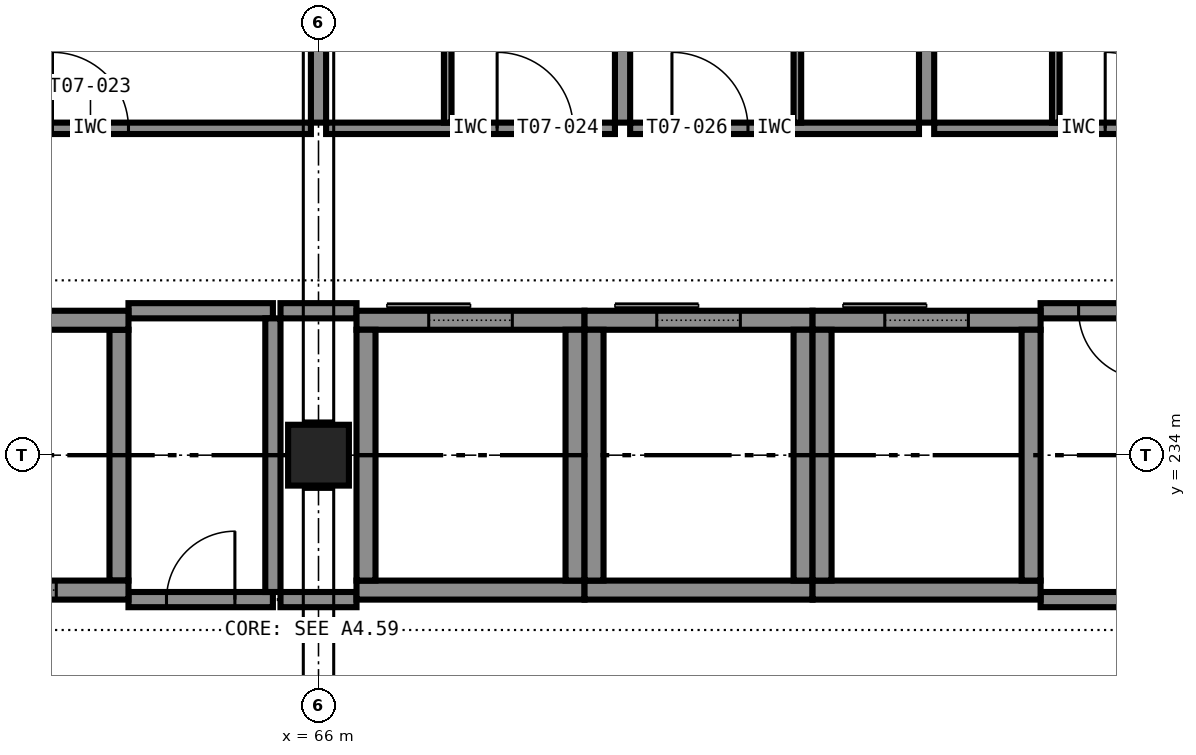
"""IFC4 building model, lengths in metres.
Left out: names, types, materials, properties, quantities, classifications, styles, units other than length and angle.
Written with IfcOpenShell. Run it as: python <this file> out.ifc"""

import sys

from ifc_helpers import new_model, si_unit, direction, frame, frame_2d, origin, origin_2d, place, context, subcontext, project, spatial, rectangle, extrude, element, fill, save


model = new_model("IFC4")
c1 = context("Model", 3, precision=1e-05, world=origin(), true_north=direction((0.0, 1.0)))
c2 = subcontext(c1, "Body", "Model", "MODEL_VIEW")
j1 = project(units=[si_unit("LENGTHUNIT", "METRE"), si_unit("PLANEANGLEUNIT", "RADIAN")], contexts=[c1])
p1 = place(None, origin())
s1 = spatial("IfcSite", under=j1, at=p1, CompositionType="ELEMENT")
p2 = place(p1, origin())
s2 = spatial("IfcBuilding", under=s1, at=p2, CompositionType="ELEMENT")
p3 = place(p2, frame((0.0, 0.0, 35.4)))
s3 = spatial("IfcBuildingStorey", under=s2, at=p3, CompositionType="ELEMENT", Elevation=35.4)
p4 = place(p3, frame((66.0, 234.0, 0.0), z_axis=(0.0, 0.0, 1.0), x_axis=(1.0, 0.0, 0.0)))
e1 = element("IfcColumn", 1, at=p4, inside=s3, PredefinedType="COLUMN", context=c2, shape_type="SweptSolid", body=[
    extrude(rectangle(XDim=0.8, YDim=0.8, at=origin_2d()), origin(), (0.0, 0.0, 1.0), 3.6),
])
p5 = place(p3, frame((60.5, 232.225, 0.0), z_axis=(0.0, 0.0, 1.0), x_axis=(1.0, 0.0, 0.0)))
e2 = element("IfcWall", 2, at=p5, inside=s3, PredefinedType="SHEAR", context=c2, shape_type="SweptSolid", body=[
    extrude(rectangle(XDim=3.0, YDim=0.25, at=frame_2d((1.5, 0.0))), origin(), (0.0, 0.0, 1.0), 3.6),
])
p6 = place(p5, frame((0.95, 0.0, 0.0)))
e3 = element("IfcOpeningElement", 3, at=p6, cuts=e2, PredefinedType="OPENING", context=c2, shape_type="SweptSolid", body=[
    extrude(rectangle(XDim=1.1, YDim=2.1, at=frame_2d((0.55, 1.05))), frame((0.0, 0.135, 0.0), z_axis=(0.0, -1.0, 0.0), x_axis=(1.0, 0.0, 0.0)), (0.0, 0.0, 1.0), 0.27),
])
p7 = place(p3, frame((60.5, 235.775, 0.0), z_axis=(0.0, 0.0, 1.0), x_axis=(1.0, 0.0, 0.0)))
e4 = element("IfcWall", 4, at=p7, inside=s3, PredefinedType="SHEAR", context=c2, shape_type="SweptSolid", body=[
    extrude(rectangle(XDim=3.0, YDim=0.25, at=frame_2d((1.5, 0.0))), origin(), (0.0, 0.0, 1.0), 3.6),
])
p8 = place(p3, frame((63.375, 232.35, 0.0), z_axis=(0.0, 0.0, 1.0), x_axis=(0.0, 1.0, 0.0)))
e5 = element("IfcWall", 5, at=p8, inside=s3, PredefinedType="SHEAR", context=c2, shape_type="SweptSolid", body=[
    extrude(rectangle(XDim=3.3, YDim=0.25, at=frame_2d((1.65, 0.0))), origin(), (0.0, 0.0, 1.0), 3.6),
])
p9 = place(p3, frame((66.5, 232.225, 0.0), z_axis=(0.0, 0.0, 1.0), x_axis=(1.0, 0.0, 0.0)))
e6 = element("IfcWall", 6, at=p9, inside=s3, PredefinedType="SHEAR", context=c2, shape_type="SweptSolid", body=[
    extrude(rectangle(XDim=3.0, YDim=0.25, at=frame_2d((1.5, 0.0))), origin(), (0.0, 0.0, 1.0), 3.6),
])
p10 = place(p3, frame((66.5, 235.775, 0.0), z_axis=(0.0, 0.0, 1.0), x_axis=(1.0, 0.0, 0.0)))
e7 = element("IfcWall", 7, at=p10, inside=s3, PredefinedType="SHEAR", context=c2, shape_type="SweptSolid", body=[
    extrude(rectangle(XDim=3.0, YDim=0.25, at=frame_2d((1.5, 0.0))), origin(), (0.0, 0.0, 1.0), 3.6),
])
p11 = place(p10, frame((0.95, 0.0, 0.0)))
e8 = element("IfcOpeningElement", 8, at=p11, cuts=e7, PredefinedType="OPENING", context=c2, shape_type="SweptSolid", body=[
    extrude(rectangle(XDim=1.1, YDim=2.1, at=frame_2d((0.55, 1.05))), frame((0.0, 0.135, 0.0), z_axis=(0.0, -1.0, 0.0), x_axis=(1.0, 0.0, 0.0)), (0.0, 0.0, 1.0), 0.27),
])
for number, where, z_axis, x_axis in (
    (9, (66.625, 232.35, 0.0), (0.0, 0.0, 1.0), (0.0, 1.0, 0.0)),
    (10, (69.375, 232.35, 0.0), (0.0, 0.0, 1.0), (0.0, 1.0, 0.0)),
):
    element("IfcWall", number, at=place(p3, frame(where, z_axis=z_axis, x_axis=x_axis)), inside=s3, PredefinedType="SHEAR", context=c2, shape_type="SweptSolid", body=[
        extrude(rectangle(XDim=3.3, YDim=0.25, at=frame_2d((1.65, 0.0))), origin(), (0.0, 0.0, 1.0), 3.6),
    ])
p12 = place(p3, frame((69.5, 232.225, 0.0), z_axis=(0.0, 0.0, 1.0), x_axis=(1.0, 0.0, 0.0)))
e11 = element("IfcWall", 11, at=p12, inside=s3, PredefinedType="SHEAR", context=c2, shape_type="SweptSolid", body=[
    extrude(rectangle(XDim=3.0, YDim=0.25, at=frame_2d((1.5, 0.0))), origin(), (0.0, 0.0, 1.0), 3.6),
])
p13 = place(p3, frame((69.5, 235.775, 0.0), z_axis=(0.0, 0.0, 1.0), x_axis=(1.0, 0.0, 0.0)))
e12 = element("IfcWall", 12, at=p13, inside=s3, PredefinedType="SHEAR", context=c2, shape_type="SweptSolid", body=[
    extrude(rectangle(XDim=3.0, YDim=0.25, at=frame_2d((1.5, 0.0))), origin(), (0.0, 0.0, 1.0), 3.6),
])
p14 = place(p13, frame((0.95, 0.0, 0.0)))
e13 = element("IfcOpeningElement", 13, at=p14, cuts=e12, PredefinedType="OPENING", context=c2, shape_type="SweptSolid", body=[
    extrude(rectangle(XDim=1.1, YDim=2.1, at=frame_2d((0.55, 1.05))), frame((0.0, 0.135, 0.0), z_axis=(0.0, -1.0, 0.0), x_axis=(1.0, 0.0, 0.0)), (0.0, 0.0, 1.0), 0.27),
])
for number, where, z_axis, x_axis in (
    (14, (69.625, 232.35, 0.0), (0.0, 0.0, 1.0), (0.0, 1.0, 0.0)),
    (15, (72.375, 232.35, 0.0), (0.0, 0.0, 1.0), (0.0, 1.0, 0.0)),
):
    element("IfcWall", number, at=place(p3, frame(where, z_axis=z_axis, x_axis=x_axis)), inside=s3, PredefinedType="SHEAR", context=c2, shape_type="SweptSolid", body=[
        extrude(rectangle(XDim=3.3, YDim=0.25, at=frame_2d((1.65, 0.0))), origin(), (0.0, 0.0, 1.0), 3.6),
    ])
p15 = place(p3, frame((72.5, 232.225, 0.0), z_axis=(0.0, 0.0, 1.0), x_axis=(1.0, 0.0, 0.0)))
e16 = element("IfcWall", 16, at=p15, inside=s3, PredefinedType="SHEAR", context=c2, shape_type="SweptSolid", body=[
    extrude(rectangle(XDim=3.0, YDim=0.25, at=frame_2d((1.5, 0.0))), origin(), (0.0, 0.0, 1.0), 3.6),
])
p16 = place(p3, frame((72.5, 235.775, 0.0), z_axis=(0.0, 0.0, 1.0), x_axis=(1.0, 0.0, 0.0)))
e17 = element("IfcWall", 17, at=p16, inside=s3, PredefinedType="SHEAR", context=c2, shape_type="SweptSolid", body=[
    extrude(rectangle(XDim=3.0, YDim=0.25, at=frame_2d((1.5, 0.0))), origin(), (0.0, 0.0, 1.0), 3.6),
])
p17 = place(p16, frame((0.95, 0.0, 0.0)))
e18 = element("IfcOpeningElement", 18, at=p17, cuts=e17, PredefinedType="OPENING", context=c2, shape_type="SweptSolid", body=[
    extrude(rectangle(XDim=1.1, YDim=2.1, at=frame_2d((0.55, 1.05))), frame((0.0, 0.135, 0.0), z_axis=(0.0, -1.0, 0.0), x_axis=(1.0, 0.0, 0.0)), (0.0, 0.0, 1.0), 0.27),
])
for number, where, z_axis, x_axis in (
    (19, (72.625, 232.35, 0.0), (0.0, 0.0, 1.0), (0.0, 1.0, 0.0)),
    (20, (75.375, 232.35, 0.0), (0.0, 0.0, 1.0), (0.0, 1.0, 0.0)),
):
    element("IfcWall", number, at=place(p3, frame(where, z_axis=z_axis, x_axis=x_axis)), inside=s3, PredefinedType="SHEAR", context=c2, shape_type="SweptSolid", body=[
        extrude(rectangle(XDim=3.3, YDim=0.25, at=frame_2d((1.65, 0.0))), origin(), (0.0, 0.0, 1.0), 3.6),
    ])
p18 = place(p3, frame((63.5, 232.1, 0.0), z_axis=(0.0, 0.0, 1.0), x_axis=(1.0, 0.0, 0.0)))
e21 = element("IfcWall", 21, at=p18, inside=s3, PredefinedType="PARTITIONING", context=c2, shape_type="SweptSolid", body=[
    extrude(rectangle(XDim=1.9, YDim=0.2, at=frame_2d((0.95, 0.0))), origin(), (0.0, 0.0, 1.0), 3.4),
])
p19 = place(p18, frame((0.5, 0.0, 0.0)))
e22 = element("IfcOpeningElement", 22, at=p19, cuts=e21, PredefinedType="OPENING", context=c2, shape_type="SweptSolid", body=[
    extrude(rectangle(XDim=0.9, YDim=2.1, at=frame_2d((0.45, 1.05))), frame((0.0, 0.11, 0.0), z_axis=(0.0, -1.0, 0.0), x_axis=(1.0, 0.0, 0.0)), (0.0, 0.0, 1.0), 0.22),
])
p20 = place(p3, frame((65.5, 232.1, 0.0), z_axis=(0.0, 0.0, 1.0), x_axis=(1.0, 0.0, 0.0)))
e23 = element("IfcWall", 23, at=p20, inside=s3, PredefinedType="PARTITIONING", context=c2, shape_type="SweptSolid", body=[
    extrude(rectangle(XDim=1.0, YDim=0.2, at=frame_2d((0.5, 0.0))), origin(), (0.0, 0.0, 1.0), 3.4),
])
for number, where, z_axis, x_axis in (
    (24, (75.5, 232.1, 0.0), (0.0, 0.0, 1.0), (1.0, 0.0, 0.0)),
    (25, (63.5, 235.9, 0.0), (0.0, 0.0, 1.0), (1.0, 0.0, 0.0)),
):
    element("IfcWall", number, at=place(p3, frame(where, z_axis=z_axis, x_axis=x_axis)), inside=s3, PredefinedType="PARTITIONING", context=c2, shape_type="SweptSolid", body=[
        extrude(rectangle(XDim=1.9, YDim=0.2, at=frame_2d((0.95, 0.0))), origin(), (0.0, 0.0, 1.0), 3.4),
    ])
p21 = place(p3, frame((65.5, 235.9, 0.0), z_axis=(0.0, 0.0, 1.0), x_axis=(1.0, 0.0, 0.0)))
e26 = element("IfcWall", 26, at=p21, inside=s3, PredefinedType="PARTITIONING", context=c2, shape_type="SweptSolid", body=[
    extrude(rectangle(XDim=1.0, YDim=0.2, at=frame_2d((0.5, 0.0))), origin(), (0.0, 0.0, 1.0), 3.4),
])
p22 = place(p3, frame((77.4, 235.9, 0.0), z_axis=(0.0, 0.0, 1.0), x_axis=(-1.0, 0.0, 0.0)))
e27 = element("IfcWall", 27, at=p22, inside=s3, PredefinedType="PARTITIONING", context=c2, shape_type="SweptSolid", body=[
    extrude(rectangle(XDim=1.9, YDim=0.2, at=frame_2d((0.95, 0.0))), origin(), (0.0, 0.0, 1.0), 3.4),
])
p23 = place(p22, frame((0.5, 0.0, 0.0)))
e28 = element("IfcOpeningElement", 28, at=p23, cuts=e27, PredefinedType="OPENING", context=c2, shape_type="SweptSolid", body=[
    extrude(rectangle(XDim=0.9, YDim=2.1, at=frame_2d((0.45, 1.05))), frame((0.0, 0.11, 0.0), z_axis=(0.0, -1.0, 0.0), x_axis=(1.0, 0.0, 0.0)), (0.0, 0.0, 1.0), 0.22),
])
p24 = place(p3, frame((65.4, 232.2, 0.0), z_axis=(0.0, 0.0, 1.0), x_axis=(0.0, 1.0, 0.0)))
e29 = element("IfcWall", 29, at=p24, inside=s3, PredefinedType="PARTITIONING", context=c2, shape_type="SweptSolid", body=[
    extrude(rectangle(XDim=3.6, YDim=0.2, at=frame_2d((1.8, 0.0))), origin(), (0.0, 0.0, 1.0), 3.4),
])
p25 = place(p3, frame((60.1, 238.3, 0.0), z_axis=(0.0, 0.0, 1.0), x_axis=(1.0, 0.0, 0.0)))
e30 = element("IfcWall", 30, at=p25, inside=s3, PredefinedType="PARTITIONING", context=c2, shape_type="SweptSolid", body=[
    extrude(rectangle(XDim=5.8, YDim=0.15, at=frame_2d((2.9, 0.0))), origin(), (0.0, 0.0, 1.0), 3.4),
])
p26 = place(p25, frame((2.4, 0.0, 0.0)))
e31 = element("IfcOpeningElement", 31, at=p26, cuts=e30, PredefinedType="OPENING", context=c2, shape_type="SweptSolid", body=[
    extrude(rectangle(XDim=1.0, YDim=2.1, at=frame_2d((0.5, 1.05))), frame((0.0, 0.085, 0.0), z_axis=(0.0, -1.0, 0.0), x_axis=(1.0, 0.0, 0.0)), (0.0, 0.0, 1.0), 0.17),
])
p27 = place(p3, frame((66.1, 238.3, 0.0), z_axis=(0.0, 0.0, 1.0), x_axis=(1.0, 0.0, 0.0)))
e32 = element("IfcWall", 32, at=p27, inside=s3, PredefinedType="PARTITIONING", context=c2, shape_type="SweptSolid", body=[
    extrude(rectangle(XDim=3.8, YDim=0.15, at=frame_2d((1.9, 0.0))), origin(), (0.0, 0.0, 1.0), 3.4),
])
p28 = place(p27, frame((2.25, 0.0, 0.0)))
e33 = element("IfcOpeningElement", 33, at=p28, cuts=e32, PredefinedType="OPENING", context=c2, shape_type="SweptSolid", body=[
    extrude(rectangle(XDim=1.0, YDim=2.1, at=frame_2d((0.5, 1.05))), frame((0.0, 0.085, 0.0), z_axis=(0.0, -1.0, 0.0), x_axis=(1.0, 0.0, 0.0)), (0.0, 0.0, 1.0), 0.17),
])
p29 = place(p3, frame((67.7, 241.25, 0.0), z_axis=(0.0, 0.0, 1.0), x_axis=(0.0, -1.0, 0.0)))
e34 = element("IfcWall", 34, at=p29, inside=s3, PredefinedType="PARTITIONING", context=c2, shape_type="SweptSolid", body=[
    extrude(rectangle(XDim=2.875, YDim=0.1, at=frame_2d((1.438, 0.0))), origin(), (0.0, 0.0, 1.0), 3.4),
])
p30 = place(p29, frame((1.038, 0.0, 0.0)))
e35 = element("IfcOpeningElement", 35, at=p30, cuts=e34, PredefinedType="OPENING", context=c2, shape_type="SweptSolid", body=[
    extrude(rectangle(XDim=0.8, YDim=2.1, at=frame_2d((0.4, 1.05))), frame((0.0, 0.06, 0.0), z_axis=(0.0, -1.0, 0.0), x_axis=(1.0, 0.0, 0.0)), (0.0, 0.0, 1.0), 0.12),
])
p31 = place(p3, frame((70.1, 238.3, 0.0), z_axis=(0.0, 0.0, 1.0), x_axis=(1.0, 0.0, 0.0)))
e36 = element("IfcWall", 36, at=p31, inside=s3, PredefinedType="PARTITIONING", context=c2, shape_type="SweptSolid", body=[
    extrude(rectangle(XDim=3.8, YDim=0.15, at=frame_2d((1.9, 0.0))), origin(), (0.0, 0.0, 1.0), 3.4),
])
p32 = place(p31, frame((0.55, 0.0, 0.0)))
e37 = element("IfcOpeningElement", 37, at=p32, cuts=e36, PredefinedType="OPENING", context=c2, shape_type="SweptSolid", body=[
    extrude(rectangle(XDim=1.0, YDim=2.1, at=frame_2d((0.5, 1.05))), frame((0.0, 0.085, 0.0), z_axis=(0.0, -1.0, 0.0), x_axis=(1.0, 0.0, 0.0)), (0.0, 0.0, 1.0), 0.17),
])
p33 = place(p3, frame((72.3, 238.375, 0.0), z_axis=(0.0, 0.0, 1.0), x_axis=(0.0, 1.0, 0.0)))
e38 = element("IfcWall", 38, at=p33, inside=s3, PredefinedType="PARTITIONING", context=c2, shape_type="SweptSolid", body=[
    extrude(rectangle(XDim=2.875, YDim=0.1, at=frame_2d((1.438, 0.0))), origin(), (0.0, 0.0, 1.0), 3.4),
])
p34 = place(p33, frame((1.038, 0.0, 0.0)))
e39 = element("IfcOpeningElement", 39, at=p34, cuts=e38, PredefinedType="OPENING", context=c2, shape_type="SweptSolid", body=[
    extrude(rectangle(XDim=0.8, YDim=2.1, at=frame_2d((0.4, 1.05))), frame((0.0, 0.06, 0.0), z_axis=(0.0, -1.0, 0.0), x_axis=(1.0, 0.0, 0.0)), (0.0, 0.0, 1.0), 0.12),
])
p35 = place(p3, frame((74.1, 238.3, 0.0), z_axis=(0.0, 0.0, 1.0), x_axis=(1.0, 0.0, 0.0)))
e40 = element("IfcWall", 40, at=p35, inside=s3, PredefinedType="PARTITIONING", context=c2, shape_type="SweptSolid", body=[
    extrude(rectangle(XDim=3.8, YDim=0.15, at=frame_2d((1.9, 0.0))), origin(), (0.0, 0.0, 1.0), 3.4),
])
p36 = place(p35, frame((2.25, 0.0, 0.0)))
e41 = element("IfcOpeningElement", 41, at=p36, cuts=e40, PredefinedType="OPENING", context=c2, shape_type="SweptSolid", body=[
    extrude(rectangle(XDim=1.0, YDim=2.1, at=frame_2d((0.5, 1.05))), frame((0.0, 0.085, 0.0), z_axis=(0.0, -1.0, 0.0), x_axis=(1.0, 0.0, 0.0)), (0.0, 0.0, 1.0), 0.17),
])
p37 = place(p3, frame((75.7, 241.25, 0.0), z_axis=(0.0, 0.0, 1.0), x_axis=(0.0, -1.0, 0.0)))
e42 = element("IfcWall", 42, at=p37, inside=s3, PredefinedType="PARTITIONING", context=c2, shape_type="SweptSolid", body=[
    extrude(rectangle(XDim=2.875, YDim=0.1, at=frame_2d((1.438, 0.0))), origin(), (0.0, 0.0, 1.0), 3.4),
])
p38 = place(p37, frame((1.038, 0.0, 0.0)))
e43 = element("IfcOpeningElement", 43, at=p38, cuts=e42, PredefinedType="OPENING", context=c2, shape_type="SweptSolid", body=[
    extrude(rectangle(XDim=0.8, YDim=2.1, at=frame_2d((0.4, 1.05))), frame((0.0, 0.06, 0.0), z_axis=(0.0, -1.0, 0.0), x_axis=(1.0, 0.0, 0.0)), (0.0, 0.0, 1.0), 0.12),
])
p39 = place(p3, frame((66.0, 245.6, 0.0), z_axis=(0.0, 0.0, 1.0), x_axis=(0.0, -1.0, 0.0)))
e44 = element("IfcWall", 44, at=p39, inside=s3, PredefinedType="PARTITIONING", context=c2, shape_type="SweptSolid", body=[
    extrude(rectangle(XDim=7.225, YDim=0.2, at=frame_2d((3.613, 0.0))), origin(), (0.0, 0.0, 1.0), 2.6),
])
for number, where, z_axis, x_axis in (
    (45, (70.0, 245.7, 0.0), (0.0, 0.0, 1.0), (0.0, -1.0, 0.0)),
    (46, (74.0, 245.7, 0.0), (0.0, 0.0, 1.0), (0.0, -1.0, 0.0)),
):
    element("IfcWall", number, at=place(p3, frame(where, z_axis=z_axis, x_axis=x_axis)), inside=s3, PredefinedType="PARTITIONING", context=c2, shape_type="SweptSolid", body=[
        extrude(rectangle(XDim=7.325, YDim=0.2, at=frame_2d((3.663, 0.0))), origin(), (0.0, 0.0, 1.0), 3.4),
    ])
p40 = place(p19, origin())
e47 = element("IfcDoor", 47, at=p40, inside=s3, OperationType="SINGLE_SWING_RIGHT", PredefinedType="DOOR", context=c2, shape_type="SweptSolid", body=[
    extrude(rectangle(XDim=0.9, YDim=2.1, at=frame_2d((0.45, 1.05))), frame((0.0, 0.025, 0.0), z_axis=(0.0, -1.0, 0.0), x_axis=(1.0, 0.0, 0.0)), (0.0, 0.0, 1.0), 0.05),
])
fill(e22, e47)
p41 = place(p23, origin())
e48 = element("IfcDoor", 48, at=p41, inside=s3, OperationType="SINGLE_SWING_LEFT", PredefinedType="DOOR", context=c2, shape_type="SweptSolid", body=[
    extrude(rectangle(XDim=0.9, YDim=2.1, at=frame_2d((0.45, 1.05))), frame((0.0, 0.025, 0.0), z_axis=(0.0, -1.0, 0.0), x_axis=(1.0, 0.0, 0.0)), (0.0, 0.0, 1.0), 0.05),
])
fill(e28, e48)
p42 = place(p26, origin())
e49 = element("IfcDoor", 49, at=p42, inside=s3, OperationType="SINGLE_SWING_LEFT", PredefinedType="DOOR", context=c2, shape_type="SweptSolid", body=[
    extrude(rectangle(XDim=1.0, YDim=2.1, at=frame_2d((0.5, 1.05))), frame((0.0, 0.025, 0.0), z_axis=(0.0, -1.0, 0.0), x_axis=(1.0, 0.0, 0.0)), (0.0, 0.0, 1.0), 0.05),
])
fill(e31, e49)
p43 = place(p28, origin())
e50 = element("IfcDoor", 50, at=p43, inside=s3, OperationType="SINGLE_SWING_LEFT", PredefinedType="DOOR", context=c2, shape_type="SweptSolid", body=[
    extrude(rectangle(XDim=1.0, YDim=2.1, at=frame_2d((0.5, 1.05))), frame((0.0, 0.025, 0.0), z_axis=(0.0, -1.0, 0.0), x_axis=(1.0, 0.0, 0.0)), (0.0, 0.0, 1.0), 0.05),
])
fill(e33, e50)
p44 = place(p32, origin())
e51 = element("IfcDoor", 51, at=p44, inside=s3, OperationType="SINGLE_SWING_LEFT", PredefinedType="DOOR", context=c2, shape_type="SweptSolid", body=[
    extrude(rectangle(XDim=1.0, YDim=2.1, at=frame_2d((0.5, 1.05))), frame((0.0, 0.025, 0.0), z_axis=(0.0, -1.0, 0.0), x_axis=(1.0, 0.0, 0.0)), (0.0, 0.0, 1.0), 0.05),
])
fill(e37, e51)
p45 = place(p36, origin())
e52 = element("IfcDoor", 52, at=p45, inside=s3, OperationType="SINGLE_SWING_LEFT", PredefinedType="DOOR", context=c2, shape_type="SweptSolid", body=[
    extrude(rectangle(XDim=1.0, YDim=2.1, at=frame_2d((0.5, 1.05))), frame((0.0, 0.025, 0.0), z_axis=(0.0, -1.0, 0.0), x_axis=(1.0, 0.0, 0.0)), (0.0, 0.0, 1.0), 0.05),
])
fill(e41, e52)
p46 = place(p6, origin())
e53 = element("IfcDoor", 53, at=p46, inside=s3, OperationType="SLIDING_TO_LEFT", PredefinedType="DOOR", context=c2, shape_type="SweptSolid", body=[
    extrude(rectangle(XDim=1.1, YDim=2.1, at=frame_2d((0.55, 1.05))), frame((0.0, 0.025, 0.0), z_axis=(0.0, -1.0, 0.0), x_axis=(1.0, 0.0, 0.0)), (0.0, 0.0, 1.0), 0.05),
])
fill(e3, e53)
p47 = place(p11, origin())
e54 = element("IfcDoor", 54, at=p47, inside=s3, OperationType="SLIDING_TO_LEFT", PredefinedType="DOOR", context=c2, shape_type="SweptSolid", body=[
    extrude(rectangle(XDim=1.1, YDim=2.1, at=frame_2d((0.55, 1.05))), frame((0.0, 0.025, 0.0), z_axis=(0.0, -1.0, 0.0), x_axis=(1.0, 0.0, 0.0)), (0.0, 0.0, 1.0), 0.05),
])
fill(e8, e54)
p48 = place(p14, origin())
e55 = element("IfcDoor", 55, at=p48, inside=s3, OperationType="SLIDING_TO_LEFT", PredefinedType="DOOR", context=c2, shape_type="SweptSolid", body=[
    extrude(rectangle(XDim=1.1, YDim=2.1, at=frame_2d((0.55, 1.05))), frame((0.0, 0.025, 0.0), z_axis=(0.0, -1.0, 0.0), x_axis=(1.0, 0.0, 0.0)), (0.0, 0.0, 1.0), 0.05),
])
fill(e13, e55)
p49 = place(p17, origin())
e56 = element("IfcDoor", 56, at=p49, inside=s3, OperationType="SLIDING_TO_LEFT", PredefinedType="DOOR", context=c2, shape_type="SweptSolid", body=[
    extrude(rectangle(XDim=1.1, YDim=2.1, at=frame_2d((0.55, 1.05))), frame((0.0, 0.025, 0.0), z_axis=(0.0, -1.0, 0.0), x_axis=(1.0, 0.0, 0.0)), (0.0, 0.0, 1.0), 0.05),
])
fill(e18, e56)
save(model, sys.argv[1])
